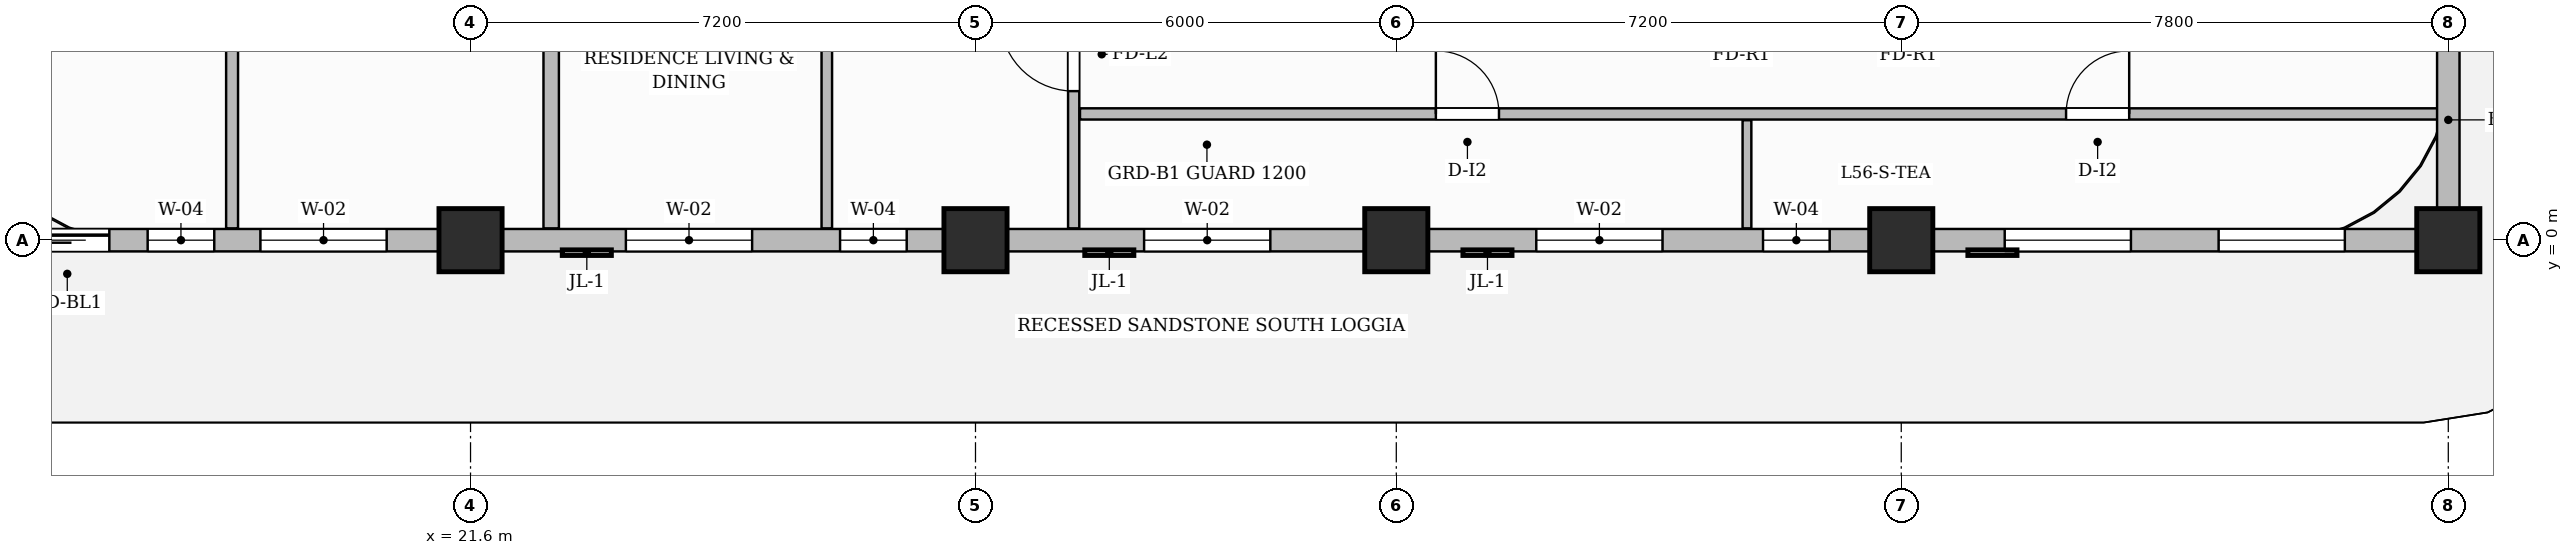
"""IFC4 building model, lengths in metres.
Left out: names, types, materials, properties, quantities, classifications, styles, units other than length and angle.
Written with IfcOpenShell. Run it as: python <this file> out.ifc"""

import sys

from ifc_helpers import new_model, si_unit, direction, frame, frame_2d, origin, origin_2d, place, context, subcontext, project, spatial, rectangle, extrude, source, transform, mapped, element, fill, save


model = new_model("IFC4")
c1 = context("Model", 3, precision=1e-05, world=origin(), true_north=direction((0.0, 1.0)))
c2 = subcontext(c1, "Body", "Model", "MODEL_VIEW")
j1 = project(units=[si_unit("LENGTHUNIT", "METRE"), si_unit("PLANEANGLEUNIT", "RADIAN")], contexts=[c1])
p1 = place(None, origin())
s1 = spatial("IfcSite", under=j1, at=p1, CompositionType="ELEMENT")
p2 = place(p1, origin())
s2 = spatial("IfcBuilding", under=s1, at=p2, CompositionType="ELEMENT")
p3 = place(p2, frame((0.0, 0.0, 225.0)))
s3 = spatial("IfcBuildingStorey", under=s2, at=p3, CompositionType="ELEMENT", Elevation=225.0)
m1 = source(origin(), c2, "Body", "SweptSolid", [
    extrude(rectangle(XDim=0.9, YDim=0.9, at=origin_2d()), origin(), (0.0, 0.0, 1.0), 3.85),
])
for number, where, z_axis, x_axis in (
    (1, (21.6, 0.0, 0.0), (0.0, 0.0, 1.0), (1.0, 0.0, 0.0)),
    (2, (28.8, 0.0, 0.0), (0.0, 0.0, 1.0), (1.0, 0.0, 0.0)),
    (3, (34.8, 0.0, 0.0), (0.0, 0.0, 1.0), (1.0, 0.0, 0.0)),
    (4, (42.0, 0.0, 0.0), (0.0, 0.0, 1.0), (1.0, 0.0, 0.0)),
    (5, (49.8, 0.0, 0.0), (0.0, 0.0, 1.0), (1.0, 0.0, 0.0)),
):
    element("IfcColumn", number, at=place(p3, frame(where, z_axis=z_axis, x_axis=x_axis)), inside=s3, PredefinedType="COLUMN", context=c2, shape_type="MappedRepresentation", body=[
        mapped(m1, transform((0.0, 0.0, 0.0), scale=1.0)),
    ])
p4 = place(p3, frame((30.2, 0.168, 0.0), z_axis=(0.0, 0.0, 1.0), x_axis=(0.0, 1.0, 0.0)))
e6 = element("IfcWall", 6, at=p4, inside=s3, PredefinedType="PARTITIONING", context=c2, shape_type="SweptSolid", body=[
    extrude(rectangle(XDim=9.492, YDim=0.16, at=frame_2d((4.746, 0.0))), origin(), (0.0, 0.0, 1.0), 3.6),
])
p5 = place(p4, frame((1.957, 0.0, 0.0)))
e7 = element("IfcOpeningElement", 7, at=p5, cuts=e6, PredefinedType="OPENING", context=c2, shape_type="SweptSolid", body=[
    extrude(rectangle(XDim=1.05, YDim=2.15, at=frame_2d((0.525, 1.075))), frame((0.0, 0.09, 0.0), z_axis=(0.0, -1.0, 0.0), x_axis=(1.0, 0.0, 0.0)), (0.0, 0.0, 1.0), 0.18),
])
p6 = place(p3, frame((30.29, 1.8, 0.0), z_axis=(0.0, 0.0, 1.0), x_axis=(1.0, 0.0, 0.0)))
e8 = element("IfcWall", 8, at=p6, inside=s3, PredefinedType="PARTITIONING", context=c2, shape_type="SweptSolid", body=[
    extrude(rectangle(XDim=19.37, YDim=0.16, at=frame_2d((9.685, 0.0))), origin(), (0.0, 0.0, 1.0), 3.6),
])
p7 = place(p6, frame((5.074, 0.0, 0.0)))
e9 = element("IfcOpeningElement", 9, at=p7, cuts=e8, PredefinedType="OPENING", context=c2, shape_type="SweptSolid", body=[
    extrude(rectangle(XDim=0.9, YDim=2.15, at=frame_2d((0.45, 1.075))), frame((0.0, 0.09, 0.0), z_axis=(0.0, -1.0, 0.0), x_axis=(1.0, 0.0, 0.0)), (0.0, 0.0, 1.0), 0.18),
])
p8 = place(p6, frame((14.06, 0.0, 0.0)))
e10 = element("IfcOpeningElement", 10, at=p8, cuts=e8, PredefinedType="OPENING", context=c2, shape_type="SweptSolid", body=[
    extrude(rectangle(XDim=0.9, YDim=2.15, at=frame_2d((0.45, 1.075))), frame((0.0, 0.09, 0.0), z_axis=(0.0, -1.0, 0.0), x_axis=(1.0, 0.0, 0.0)), (0.0, 0.0, 1.0), 0.18),
])
p9 = place(p3, frame((39.8, 0.168, 0.0), z_axis=(0.0, 0.0, 1.0), x_axis=(0.0, 1.0, 0.0)))
e11 = element("IfcWall", 11, at=p9, inside=s3, PredefinedType="PARTITIONING", context=c2, shape_type="SweptSolid", body=[
    extrude(rectangle(XDim=1.542, YDim=0.125, at=frame_2d((0.771, 0.0))), origin(), (0.0, 0.0, 1.0), 3.6),
])
p10 = place(p3, frame((18.2, 0.168, 0.0), z_axis=(0.0, 0.0, 1.0), x_axis=(0.0, 1.0, 0.0)))
e12 = element("IfcWall", 12, at=p10, inside=s3, PredefinedType="PARTITIONING", context=c2, shape_type="SweptSolid", body=[
    extrude(rectangle(XDim=9.492, YDim=0.17, at=frame_2d((4.746, 0.0))), origin(), (0.0, 0.0, 1.0), 3.315),
])
p11 = place(p3, frame((22.75, 0.168, 0.0), z_axis=(0.0, 0.0, 1.0), x_axis=(0.0, 1.0, 0.0)))
e13 = element("IfcWall", 13, at=p11, inside=s3, PredefinedType="PARTITIONING", context=c2, shape_type="SweptSolid", body=[
    extrude(rectangle(XDim=9.492, YDim=0.22, at=frame_2d((4.746, 0.0))), origin(), (0.0, 0.0, 1.0), 3.6),
])
p12 = place(p3, frame((26.68, 0.168, 0.0), z_axis=(0.0, 0.0, 1.0), x_axis=(0.0, 1.0, 0.0)))
e14 = element("IfcWall", 14, at=p12, inside=s3, PredefinedType="PARTITIONING", context=c2, shape_type="SweptSolid", body=[
    extrude(rectangle(XDim=9.492, YDim=0.15, at=frame_2d((4.746, 0.0))), origin(), (0.0, 0.0, 1.0), 3.6),
])
p13 = place(p12, frame((8.057, 0.0, 0.0)))
e15 = element("IfcOpeningElement", 15, at=p13, cuts=e14, PredefinedType="OPENING", context=c2, shape_type="SweptSolid", body=[
    extrude(rectangle(XDim=0.9, YDim=2.15, at=frame_2d((0.45, 1.075))), frame((0.0, 0.085, 0.0), z_axis=(0.0, -1.0, 0.0), x_axis=(1.0, 0.0, 0.0)), (0.0, 0.0, 1.0), 0.17),
])
p14 = place(p3, frame((14.4, 0.0, 0.0), z_axis=(0.0, 0.0, 1.0), x_axis=(1.0, 0.0, 0.0)))
e16 = element("IfcWall", 16, at=p14, inside=s3, PredefinedType="SOLIDWALL", context=c2, shape_type="SweptSolid", body=[
    extrude(rectangle(XDim=35.4, YDim=0.32, at=frame_2d((17.7, 0.0))), origin(), (0.0, 0.0, 1.0), 3.135),
])
p15 = place(p14, frame((0.85, 0.0, 0.0)))
e17 = element("IfcOpeningElement", 17, at=p15, cuts=e16, PredefinedType="OPENING", context=c2, shape_type="SweptSolid", body=[
    extrude(rectangle(XDim=1.2, YDim=2.2, at=frame_2d((0.6, 1.1))), frame((0.0, 0.17, 0.0), z_axis=(0.0, -1.0, 0.0), x_axis=(1.0, 0.0, 0.0)), (0.0, 0.0, 1.0), 0.34),
])
p16 = place(p14, frame((2.596, 0.0, 0.8)))
e18 = element("IfcOpeningElement", 18, at=p16, cuts=e16, PredefinedType="OPENING", context=c2, shape_type="SweptSolid", body=[
    extrude(rectangle(XDim=0.95, YDim=1.75, at=frame_2d((0.475, 0.875))), frame((0.0, 0.17, 0.0), z_axis=(0.0, -1.0, 0.0), x_axis=(1.0, 0.0, 0.0)), (0.0, 0.0, 1.0), 0.34),
])
p17 = place(p14, frame((4.204, 0.0, 0.8)))
e19 = element("IfcOpeningElement", 19, at=p17, cuts=e16, PredefinedType="OPENING", context=c2, shape_type="SweptSolid", body=[
    extrude(rectangle(XDim=1.8, YDim=1.85, at=frame_2d((0.9, 0.925))), frame((0.0, 0.17, 0.0), z_axis=(0.0, -1.0, 0.0), x_axis=(1.0, 0.0, 0.0)), (0.0, 0.0, 1.0), 0.34),
])
p18 = place(p14, frame((9.415, 0.0, 0.8)))
e20 = element("IfcOpeningElement", 20, at=p18, cuts=e16, PredefinedType="OPENING", context=c2, shape_type="SweptSolid", body=[
    extrude(rectangle(XDim=1.8, YDim=1.85, at=frame_2d((0.9, 0.925))), frame((0.0, 0.17, 0.0), z_axis=(0.0, -1.0, 0.0), x_axis=(1.0, 0.0, 0.0)), (0.0, 0.0, 1.0), 0.34),
])
p19 = place(p14, frame((12.469, 0.0, 0.8)))
e21 = element("IfcOpeningElement", 21, at=p19, cuts=e16, PredefinedType="OPENING", context=c2, shape_type="SweptSolid", body=[
    extrude(rectangle(XDim=0.95, YDim=1.75, at=frame_2d((0.475, 0.875))), frame((0.0, 0.17, 0.0), z_axis=(0.0, -1.0, 0.0), x_axis=(1.0, 0.0, 0.0)), (0.0, 0.0, 1.0), 0.34),
])
p20 = place(p14, frame((16.804, 0.0, 0.8)))
e22 = element("IfcOpeningElement", 22, at=p20, cuts=e16, PredefinedType="OPENING", context=c2, shape_type="SweptSolid", body=[
    extrude(rectangle(XDim=1.8, YDim=1.85, at=frame_2d((0.9, 0.925))), frame((0.0, 0.17, 0.0), z_axis=(0.0, -1.0, 0.0), x_axis=(1.0, 0.0, 0.0)), (0.0, 0.0, 1.0), 0.34),
])
p21 = place(p14, frame((22.396, 0.0, 0.8)))
e23 = element("IfcOpeningElement", 23, at=p21, cuts=e16, PredefinedType="OPENING", context=c2, shape_type="SweptSolid", body=[
    extrude(rectangle(XDim=1.8, YDim=1.85, at=frame_2d((0.9, 0.925))), frame((0.0, 0.17, 0.0), z_axis=(0.0, -1.0, 0.0), x_axis=(1.0, 0.0, 0.0)), (0.0, 0.0, 1.0), 0.34),
])
p22 = place(p14, frame((25.629, 0.0, 0.8)))
e24 = element("IfcOpeningElement", 24, at=p22, cuts=e16, PredefinedType="OPENING", context=c2, shape_type="SweptSolid", body=[
    extrude(rectangle(XDim=0.95, YDim=1.75, at=frame_2d((0.475, 0.875))), frame((0.0, 0.17, 0.0), z_axis=(0.0, -1.0, 0.0), x_axis=(1.0, 0.0, 0.0)), (0.0, 0.0, 1.0), 0.34),
])
p23 = place(p14, frame((29.075, 0.0, 0.8)))
e25 = element("IfcOpeningElement", 25, at=p23, cuts=e16, PredefinedType="OPENING", context=c2, shape_type="SweptSolid", body=[
    extrude(rectangle(XDim=1.8, YDim=1.85, at=frame_2d((0.9, 0.925))), frame((0.0, 0.17, 0.0), z_axis=(0.0, -1.0, 0.0), x_axis=(1.0, 0.0, 0.0)), (0.0, 0.0, 1.0), 0.34),
])
p24 = place(p14, frame((32.125, 0.0, 0.8)))
e26 = element("IfcOpeningElement", 26, at=p24, cuts=e16, PredefinedType="OPENING", context=c2, shape_type="SweptSolid", body=[
    extrude(rectangle(XDim=1.8, YDim=1.85, at=frame_2d((0.9, 0.925))), frame((0.0, 0.17, 0.0), z_axis=(0.0, -1.0, 0.0), x_axis=(1.0, 0.0, 0.0)), (0.0, 0.0, 1.0), 0.34),
])
p25 = place(p3, frame((49.8, 0.05, 0.0), z_axis=(0.0, 0.0, 1.0), x_axis=(0.0, 1.0, 0.0)))
e27 = element("IfcWall", 27, at=p25, inside=s3, PredefinedType="SOLIDWALL", context=c2, shape_type="SweptSolid", body=[
    extrude(rectangle(XDim=3.33, YDim=0.32, at=frame_2d((1.665, 0.0))), origin(), (0.0, 0.0, 1.0), 3.6),
])
m2 = source(origin(), c2, "Body", "SweptSolid", [
    extrude(rectangle(XDim=1.05, YDim=2.15, at=frame_2d((0.525, 1.075))), frame((0.0, 0.025, 0.0), z_axis=(0.0, -1.0, 0.0), x_axis=(1.0, 0.0, 0.0)), (0.0, 0.0, 1.0), 0.05),
])
p26 = place(p5, origin())
e28 = element("IfcDoor", 28, at=p26, inside=s3, OperationType="SINGLE_SWING_RIGHT", PredefinedType="DOOR", context=c2, shape_type="MappedRepresentation", body=[
    mapped(m2, transform((0.0, 0.0, 0.0), scale=1.0)),
])
fill(e7, e28)
m3 = source(origin(), c2, "Body", "SweptSolid", [
    extrude(rectangle(XDim=0.9, YDim=2.15, at=frame_2d((0.45, 1.075))), frame((0.0, 0.025, 0.0), z_axis=(0.0, -1.0, 0.0), x_axis=(1.0, 0.0, 0.0)), (0.0, 0.0, 1.0), 0.05),
])
p27 = place(p7, origin())
e29 = element("IfcDoor", 29, at=p27, inside=s3, OperationType="SINGLE_SWING_LEFT", PredefinedType="DOOR", context=c2, shape_type="MappedRepresentation", body=[
    mapped(m3, transform((0.0, 0.0, 0.0), scale=1.0)),
])
fill(e9, e29)
p28 = place(p8, origin())
e30 = element("IfcDoor", 30, at=p28, inside=s3, OperationType="SINGLE_SWING_RIGHT", PredefinedType="DOOR", context=c2, shape_type="MappedRepresentation", body=[
    mapped(m3, transform((0.0, 0.0, 0.0), scale=1.0)),
])
fill(e10, e30)
m4 = source(origin(), c2, "Body", "SweptSolid", [
    extrude(rectangle(XDim=1.2, YDim=2.2, at=frame_2d((0.6, 1.1))), frame((0.0, 0.025, 0.0), z_axis=(0.0, -1.0, 0.0), x_axis=(1.0, 0.0, 0.0)), (0.0, 0.0, 1.0), 0.05),
])
p29 = place(p15, origin())
e31 = element("IfcDoor", 31, at=p29, inside=s3, OperationType="SLIDING_TO_LEFT", PredefinedType="DOOR", context=c2, shape_type="MappedRepresentation", body=[
    mapped(m4, transform((0.0, 0.0, 0.0), scale=1.0)),
])
fill(e17, e31)
m5 = source(origin(), c2, "Body", "SweptSolid", [
    extrude(rectangle(XDim=0.95, YDim=1.75, at=frame_2d((0.475, 0.875))), frame((0.0, 0.03, 0.0), z_axis=(0.0, -1.0, 0.0), x_axis=(1.0, 0.0, 0.0)), (0.0, 0.0, 1.0), 0.06),
])
p30 = place(p16, origin())
e32 = element("IfcWindow", 32, at=p30, inside=s3, PartitioningType="SINGLE_PANEL", PredefinedType="WINDOW", context=c2, shape_type="MappedRepresentation", body=[
    mapped(m5, transform((0.0, 0.0, 0.0), scale=1.0)),
])
fill(e18, e32)
m6 = source(origin(), c2, "Body", "SweptSolid", [
    extrude(rectangle(XDim=1.8, YDim=1.85, at=frame_2d((0.9, 0.925))), frame((0.0, 0.03, 0.0), z_axis=(0.0, -1.0, 0.0), x_axis=(1.0, 0.0, 0.0)), (0.0, 0.0, 1.0), 0.06),
])
p31 = place(p17, origin())
e33 = element("IfcWindow", 33, at=p31, inside=s3, PartitioningType="DOUBLE_PANEL_VERTICAL", PredefinedType="WINDOW", context=c2, shape_type="MappedRepresentation", body=[
    mapped(m6, transform((0.0, 0.0, 0.0), scale=1.0)),
])
fill(e19, e33)
p32 = place(p18, origin())
e34 = element("IfcWindow", 34, at=p32, inside=s3, PartitioningType="DOUBLE_PANEL_VERTICAL", PredefinedType="WINDOW", context=c2, shape_type="MappedRepresentation", body=[
    mapped(m6, transform((0.0, 0.0, 0.0), scale=1.0)),
])
fill(e20, e34)
p33 = place(p19, origin())
e35 = element("IfcWindow", 35, at=p33, inside=s3, PartitioningType="SINGLE_PANEL", PredefinedType="WINDOW", context=c2, shape_type="MappedRepresentation", body=[
    mapped(m5, transform((0.0, 0.0, 0.0), scale=1.0)),
])
fill(e21, e35)
p34 = place(p20, origin())
e36 = element("IfcWindow", 36, at=p34, inside=s3, PartitioningType="DOUBLE_PANEL_VERTICAL", PredefinedType="WINDOW", context=c2, shape_type="MappedRepresentation", body=[
    mapped(m6, transform((0.0, 0.0, 0.0), scale=1.0)),
])
fill(e22, e36)
p35 = place(p21, origin())
e37 = element("IfcWindow", 37, at=p35, inside=s3, PartitioningType="DOUBLE_PANEL_VERTICAL", PredefinedType="WINDOW", context=c2, shape_type="MappedRepresentation", body=[
    mapped(m6, transform((0.0, 0.0, 0.0), scale=1.0)),
])
fill(e23, e37)
p36 = place(p22, origin())
e38 = element("IfcWindow", 38, at=p36, inside=s3, PartitioningType="SINGLE_PANEL", PredefinedType="WINDOW", context=c2, shape_type="MappedRepresentation", body=[
    mapped(m5, transform((0.0, 0.0, 0.0), scale=1.0)),
])
fill(e24, e38)
p37 = place(p23, origin())
e39 = element("IfcWindow", 39, at=p37, inside=s3, PartitioningType="DOUBLE_PANEL_VERTICAL", PredefinedType="WINDOW", context=c2, shape_type="MappedRepresentation", body=[
    mapped(m6, transform((0.0, 0.0, 0.0), scale=1.0)),
])
fill(e25, e39)
p38 = place(p24, origin())
e40 = element("IfcWindow", 40, at=p38, inside=s3, PartitioningType="DOUBLE_PANEL_VERTICAL", PredefinedType="WINDOW", context=c2, shape_type="MappedRepresentation", body=[
    mapped(m6, transform((0.0, 0.0, 0.0), scale=1.0)),
])
fill(e26, e40)
save(model, sys.argv[1])
